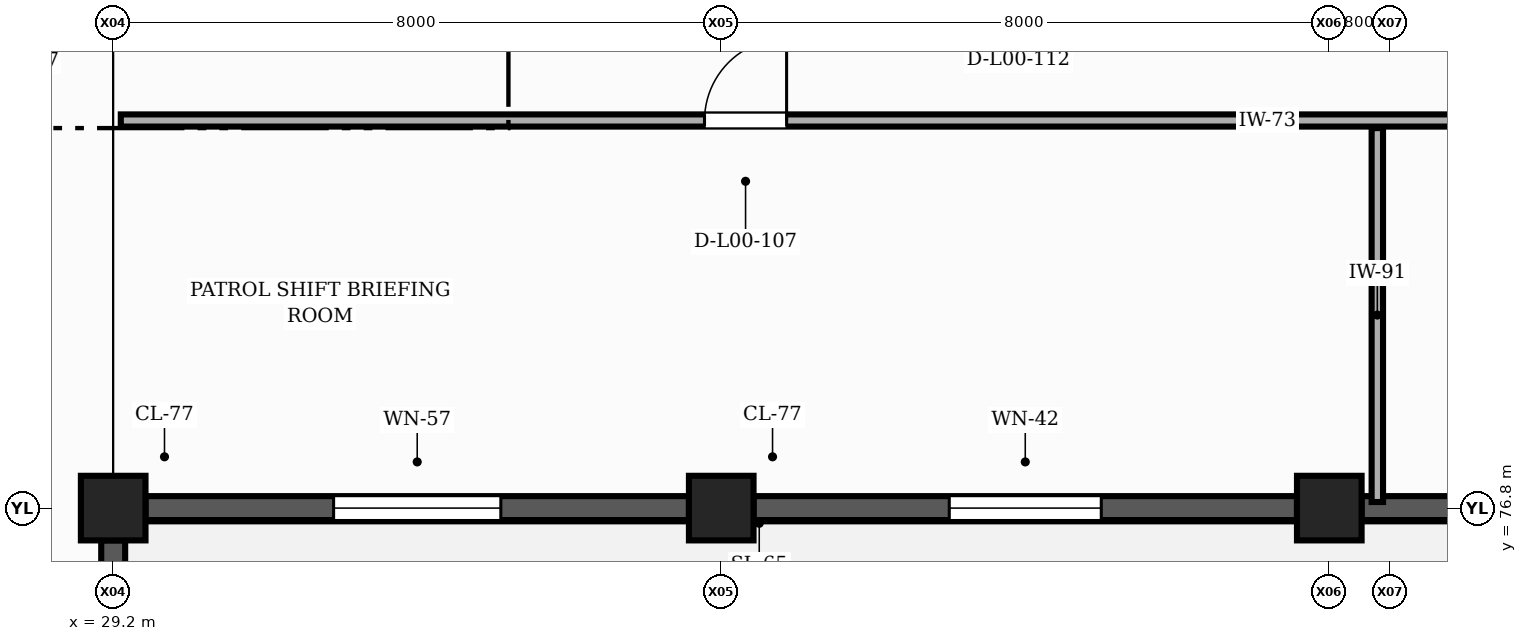
"""IFC4 building model, lengths in metres.
Left out: names, types, materials, properties, quantities, classifications, styles, units other than length and angle.
Written with IfcOpenShell. Run it as: python <this file> out.ifc"""

import sys

from ifc_helpers import new_model, si_unit, direction, frame, frame_2d, origin, origin_2d, place, context, subcontext, project, spatial, rectangle, extrude, element, fill, save


model = new_model("IFC4")
c1 = context("Model", 3, precision=1e-05, world=origin(), true_north=direction((0.0, 1.0)))
c2 = subcontext(c1, "Body", "Model", "MODEL_VIEW")
j1 = project(units=[si_unit("LENGTHUNIT", "METRE"), si_unit("PLANEANGLEUNIT", "RADIAN")], contexts=[c1])
p1 = place(None, origin())
s1 = spatial("IfcSite", under=j1, at=p1, CompositionType="ELEMENT")
p2 = place(p1, origin())
s2 = spatial("IfcBuilding", under=s1, at=p2, CompositionType="ELEMENT")
p3 = place(p2, origin())
s3 = spatial("IfcBuildingStorey", under=s2, at=p3, CompositionType="ELEMENT", Elevation=0.0)
for number, where, z_axis, x_axis in (
    (1, (29.2, 76.8, 0.0), (0.0, 0.0, 1.0), (1.0, 0.0, 0.0)),
    (2, (37.2, 76.8, 0.0), (0.0, 0.0, 1.0), (1.0, 0.0, 0.0)),
    (3, (45.2, 76.8, 0.0), (0.0, 0.0, 1.0), (1.0, 0.0, 0.0)),
):
    element("IfcColumn", number, at=place(p3, frame(where, z_axis=z_axis, x_axis=x_axis)), inside=s3, PredefinedType="COLUMN", context=c2, shape_type="SweptSolid", body=[
        extrude(rectangle(XDim=0.85, YDim=0.85, at=origin_2d()), origin(), (0.0, 0.0, 1.0), 4.8),
    ])
p4 = place(p3, frame((29.2, 69.15, 0.0), z_axis=(0.0, 0.0, 1.0), x_axis=(0.0, 1.0, 0.0)))
e4 = element("IfcWall", 4, at=p4, inside=s3, PredefinedType="SOLIDWALL", context=c2, shape_type="SweptSolid", body=[
    extrude(rectangle(XDim=7.225, YDim=0.315, at=frame_2d((3.613, 0.0))), origin(), (0.0, 0.0, 1.0), 3.88),
])
p5 = place(p4, frame((2.512, 0.0, 0.9)))
e5 = element("IfcOpeningElement", 5, at=p5, cuts=e4, PredefinedType="OPENING", context=c2, shape_type="SweptSolid", body=[
    extrude(rectangle(XDim=2.2, YDim=1.6, at=frame_2d((1.1, 0.8))), frame((0.0, 0.167, 0.0), z_axis=(0.0, -1.0, 0.0), x_axis=(1.0, 0.0, 0.0)), (0.0, 0.0, 1.0), 0.335),
])
p6 = place(p3, frame((29.625, 76.8, 0.0), z_axis=(0.0, 0.0, 1.0), x_axis=(1.0, 0.0, 0.0)))
e6 = element("IfcWall", 6, at=p6, inside=s3, PredefinedType="SOLIDWALL", context=c2, shape_type="SweptSolid", body=[
    extrude(rectangle(XDim=7.15, YDim=0.315, at=frame_2d((3.575, 0.0))), origin(), (0.0, 0.0, 1.0), 3.78),
])
p7 = place(p6, frame((2.475, 0.0, 0.9)))
e7 = element("IfcOpeningElement", 7, at=p7, cuts=e6, PredefinedType="OPENING", context=c2, shape_type="SweptSolid", body=[
    extrude(rectangle(XDim=2.2, YDim=1.6, at=frame_2d((1.1, 0.8))), frame((0.0, 0.167, 0.0), z_axis=(0.0, -1.0, 0.0), x_axis=(1.0, 0.0, 0.0)), (0.0, 0.0, 1.0), 0.335),
])
p8 = place(p3, frame((37.625, 76.8, 0.0), z_axis=(0.0, 0.0, 1.0), x_axis=(1.0, 0.0, 0.0)))
e8 = element("IfcWall", 8, at=p8, inside=s3, PredefinedType="SOLIDWALL", context=c2, shape_type="SweptSolid", body=[
    extrude(rectangle(XDim=7.15, YDim=0.315, at=frame_2d((3.575, 0.0))), origin(), (0.0, 0.0, 1.0), 3.78),
])
p9 = place(p8, frame((2.575, 0.0, 0.9)))
e9 = element("IfcOpeningElement", 9, at=p9, cuts=e8, PredefinedType="OPENING", context=c2, shape_type="SweptSolid", body=[
    extrude(rectangle(XDim=2.0, YDim=1.5, at=frame_2d((1.0, 0.75))), frame((0.0, 0.167, 0.0), z_axis=(0.0, -1.0, 0.0), x_axis=(1.0, 0.0, 0.0)), (0.0, 0.0, 1.0), 0.335),
])
p10 = place(p3, frame((45.625, 76.8, 0.0), z_axis=(0.0, 0.0, 1.0), x_axis=(1.0, 0.0, 0.0)))
e10 = element("IfcWall", 10, at=p10, inside=s3, PredefinedType="SOLIDWALL", context=c2, shape_type="SweptSolid", body=[
    extrude(rectangle(XDim=7.95, YDim=0.315, at=frame_2d((3.975, 0.0))), origin(), (0.0, 0.0, 1.0), 3.78),
])
p11 = place(p10, frame((3.075, 0.0, 0.9)))
e11 = element("IfcOpeningElement", 11, at=p11, cuts=e10, PredefinedType="OPENING", context=c2, shape_type="SweptSolid", body=[
    extrude(rectangle(XDim=1.8, YDim=1.4, at=frame_2d((0.9, 0.7))), frame((0.0, 0.167, 0.0), z_axis=(0.0, -1.0, 0.0), x_axis=(1.0, 0.0, 0.0)), (0.0, 0.0, 1.0), 0.335),
])
p12 = place(p3, frame((45.832, 76.88, 0.0), z_axis=(0.0, 0.0, 1.0), x_axis=(0.0, 1.0, 0.0)))
e12 = element("IfcWall", 12, at=p12, inside=s3, PredefinedType="PARTITIONING", context=c2, shape_type="SweptSolid", body=[
    extrude(rectangle(XDim=4.92, YDim=0.15, at=frame_2d((2.46, 0.0))), origin(), (0.0, 0.0, 1.0), 3.765),
])
p13 = place(p3, frame((29.3, 81.9, 0.0), z_axis=(0.0, 0.0, 1.0), x_axis=(1.0, 0.0, 0.0)))
e13 = element("IfcWall", 13, at=p13, inside=s3, PredefinedType="PARTITIONING", context=c2, shape_type="SweptSolid", body=[
    extrude(rectangle(XDim=72.62, YDim=0.16, at=frame_2d((36.31, 0.0))), origin(), (0.0, 0.0, 1.0), 3.765),
])
p14 = place(p13, frame((7.68, 0.0, 0.0)))
e14 = element("IfcOpeningElement", 14, at=p14, cuts=e13, PredefinedType="OPENING", context=c2, shape_type="SweptSolid", body=[
    extrude(rectangle(XDim=1.08, YDim=2.14, at=frame_2d((0.54, 1.07))), frame((0.0, 0.09, 0.0), z_axis=(0.0, -1.0, 0.0), x_axis=(1.0, 0.0, 0.0)), (0.0, 0.0, 1.0), 0.18),
])
p15 = place(p13, frame((23.6, 0.0, 0.0)))
e15 = element("IfcOpeningElement", 15, at=p15, cuts=e13, PredefinedType="OPENING", context=c2, shape_type="SweptSolid", body=[
    extrude(rectangle(XDim=1.1, YDim=2.1, at=frame_2d((0.55, 1.05))), frame((0.0, 0.09, 0.0), z_axis=(0.0, -1.0, 0.0), x_axis=(1.0, 0.0, 0.0)), (0.0, 0.0, 1.0), 0.18),
])
p16 = place(p13, frame((36.75, 0.0, 0.0)))
e16 = element("IfcOpeningElement", 16, at=p16, cuts=e13, PredefinedType="OPENING", context=c2, shape_type="SweptSolid", body=[
    extrude(rectangle(XDim=0.9, YDim=2.1, at=frame_2d((0.45, 1.05))), frame((0.0, 0.09, 0.0), z_axis=(0.0, -1.0, 0.0), x_axis=(1.0, 0.0, 0.0)), (0.0, 0.0, 1.0), 0.18),
])
p17 = place(p13, frame((49.34, 0.0, 0.0)))
e17 = element("IfcOpeningElement", 17, at=p17, cuts=e13, PredefinedType="OPENING", context=c2, shape_type="SweptSolid", body=[
    extrude(rectangle(XDim=0.92, YDim=2.1, at=frame_2d((0.46, 1.05))), frame((0.0, 0.09, 0.0), z_axis=(0.0, -1.0, 0.0), x_axis=(1.0, 0.0, 0.0)), (0.0, 0.0, 1.0), 0.18),
])
p18 = place(p13, frame((64.17, 0.0, 0.0)))
e18 = element("IfcOpeningElement", 18, at=p18, cuts=e13, PredefinedType="OPENING", context=c2, shape_type="SweptSolid", body=[
    extrude(rectangle(XDim=0.95, YDim=2.1, at=frame_2d((0.475, 1.05))), frame((0.0, 0.09, 0.0), z_axis=(0.0, -1.0, 0.0), x_axis=(1.0, 0.0, 0.0)), (0.0, 0.0, 1.0), 0.18),
])
p19 = place(p7, origin())
e19 = element("IfcWindow", 19, at=p19, inside=s3, PartitioningType="SINGLE_PANEL", PredefinedType="WINDOW", context=c2, shape_type="SweptSolid", body=[
    extrude(rectangle(XDim=2.2, YDim=1.6, at=frame_2d((1.1, 0.8))), frame((0.0, 0.03, 0.0), z_axis=(0.0, -1.0, 0.0), x_axis=(1.0, 0.0, 0.0)), (0.0, 0.0, 1.0), 0.06),
])
fill(e7, e19)
p20 = place(p9, origin())
e20 = element("IfcWindow", 20, at=p20, inside=s3, PartitioningType="SINGLE_PANEL", PredefinedType="WINDOW", context=c2, shape_type="SweptSolid", body=[
    extrude(rectangle(XDim=2.0, YDim=1.5, at=frame_2d((1.0, 0.75))), frame((0.0, 0.03, 0.0), z_axis=(0.0, -1.0, 0.0), x_axis=(1.0, 0.0, 0.0)), (0.0, 0.0, 1.0), 0.06),
])
fill(e9, e20)
p21 = place(p14, origin())
e21 = element("IfcDoor", 21, at=p21, inside=s3, OperationType="SINGLE_SWING_RIGHT", PredefinedType="DOOR", context=c2, shape_type="SweptSolid", body=[
    extrude(rectangle(XDim=1.08, YDim=2.14, at=frame_2d((0.54, 1.07))), frame((0.0, 0.025, 0.0), z_axis=(0.0, -1.0, 0.0), x_axis=(1.0, 0.0, 0.0)), (0.0, 0.0, 1.0), 0.05),
])
fill(e14, e21)
save(model, sys.argv[1])
